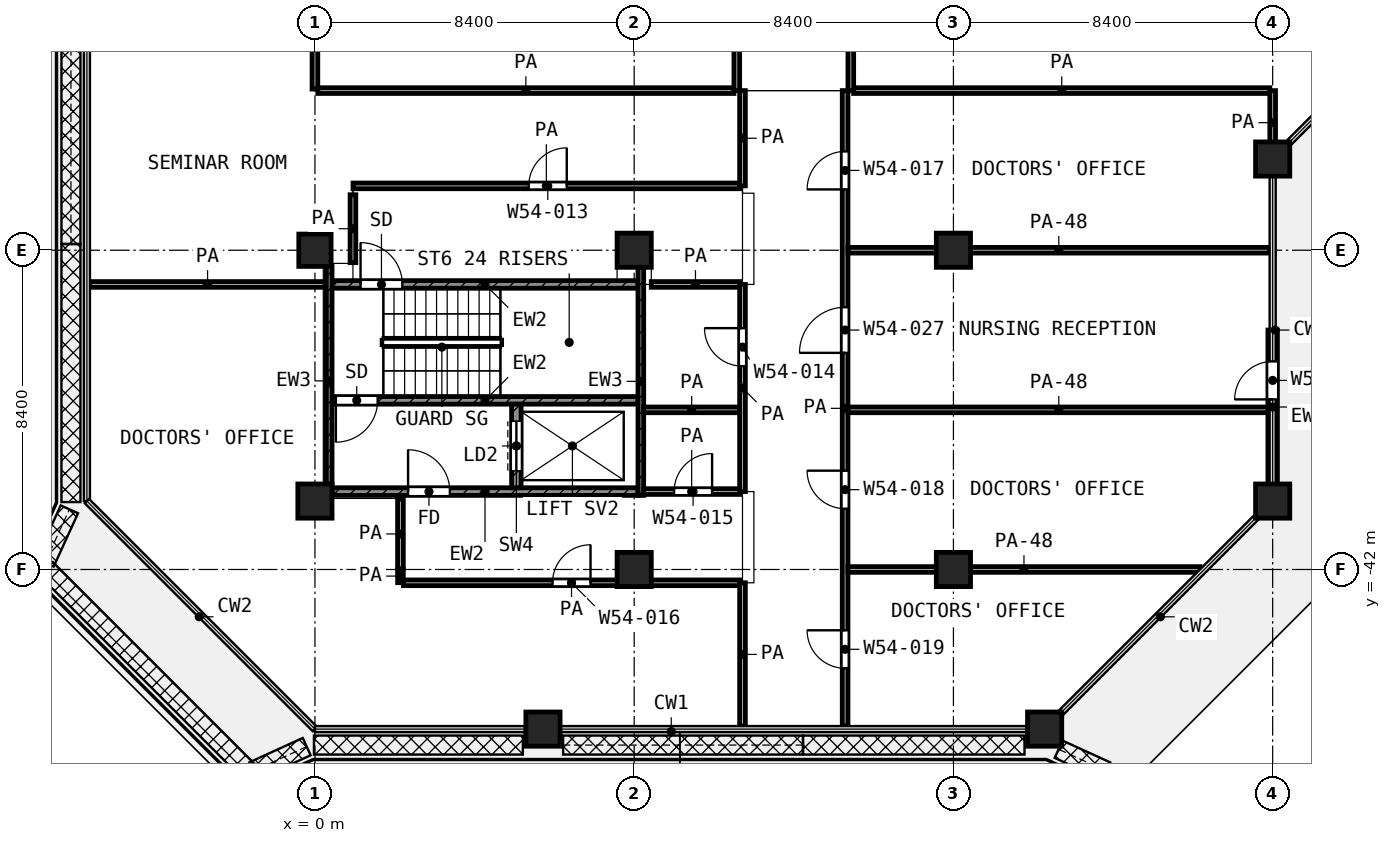
"""IFC4 building model, lengths in metres.
Left out: names, types, materials, properties, quantities, classifications, styles, units other than length and angle.
Written with IfcOpenShell. Run it as: python <this file> out.ifc"""

import sys

from ifc_helpers import new_model, si_unit, direction, frame, frame_2d, origin, origin_2d, place, context, subcontext, project, spatial, rectangle, extrude, element, fill, save


model = new_model("IFC4")
c1 = context("Model", 3, precision=1e-05, world=origin(), true_north=direction((0.0, 1.0)))
c2 = subcontext(c1, "Body", "Model", "MODEL_VIEW")
j1 = project(units=[si_unit("LENGTHUNIT", "METRE"), si_unit("PLANEANGLEUNIT", "RADIAN")], contexts=[c1])
p1 = place(None, origin())
s1 = spatial("IfcSite", under=j1, at=p1, CompositionType="ELEMENT")
p2 = place(p1, origin())
s2 = spatial("IfcBuilding", under=s1, at=p2, CompositionType="ELEMENT")
p3 = place(p2, frame((0.0, 0.0, 255.8)))
s3 = spatial("IfcBuildingStorey", under=s2, at=p3, CompositionType="ELEMENT", Elevation=255.8)
p4 = place(p3, frame((25.2, -31.2, 0.0), z_axis=(0.0, 0.0, 1.0), x_axis=(1.0, 0.0, 0.0)))
e1 = element("IfcColumn", 1, at=p4, inside=s3, PredefinedType="COLUMN", context=c2, shape_type="SweptSolid", body=[
    extrude(rectangle(XDim=0.9, YDim=0.9, at=origin_2d()), origin(), (0.0, 0.0, 1.0), 4.2),
])
p5 = place(p3, frame((0.0, -33.6, 0.0), z_axis=(0.0, 0.0, 1.0), x_axis=(1.0, 0.0, 0.0)))
e2 = element("IfcColumn", 2, at=p5, inside=s3, PredefinedType="COLUMN", context=c2, shape_type="SweptSolid", body=[
    extrude(rectangle(XDim=0.85, YDim=0.85, at=origin_2d()), origin(), (0.0, 0.0, 1.0), 4.2),
])
for number, where, z_axis, x_axis in (
    (3, (8.4, -33.6, 0.0), (0.0, 0.0, 1.0), (1.0, 0.0, 0.0)),
    (4, (16.8, -33.6, 0.0), (0.0, 0.0, 1.0), (1.0, 0.0, 0.0)),
    (5, (0.0, -40.2, 0.0), (0.0, 0.0, 1.0), (1.0, 0.0, 0.0)),
    (6, (25.2, -40.2, 0.0), (0.0, 0.0, 1.0), (1.0, 0.0, 0.0)),
    (7, (8.4, -42.0, 0.0), (0.0, 0.0, 1.0), (1.0, 0.0, 0.0)),
    (8, (16.8, -42.0, 0.0), (0.0, 0.0, 1.0), (1.0, 0.0, 0.0)),
    (9, (6.0, -46.2, 0.0), (0.0, 0.0, 1.0), (1.0, 0.0, 0.0)),
    (10, (19.2, -46.2, 0.0), (0.0, 0.0, 1.0), (1.0, 0.0, 0.0)),
):
    element("IfcColumn", number, at=place(p3, frame(where, z_axis=z_axis, x_axis=x_axis)), inside=s3, PredefinedType="COLUMN", context=c2, shape_type="SweptSolid", body=[
        extrude(rectangle(XDim=0.9, YDim=0.9, at=origin_2d()), origin(), (0.0, 0.0, 1.0), 4.2),
    ])
p6 = place(p3, frame((25.2, -39.75, 0.0), z_axis=(0.0, 0.0, 1.0), x_axis=(0.0, 1.0, 0.0)))
e11 = element("IfcWall", 11, at=p6, inside=s3, PredefinedType="SOLIDWALL", context=c2, shape_type="SweptSolid", body=[
    extrude(rectangle(XDim=4.05, YDim=0.25, at=frame_2d((2.025, 0.0))), origin(), (0.0, 0.0, 1.0), 2.58),
])
p7 = place(p6, frame((2.225, 0.0, 0.0)))
e12 = element("IfcOpeningElement", 12, at=p7, cuts=e11, PredefinedType="OPENING", context=c2, shape_type="SweptSolid", body=[
    extrude(rectangle(XDim=1.0, YDim=2.1, at=frame_2d((0.5, 1.05))), frame((0.0, 0.135, 0.0), z_axis=(0.0, -1.0, 0.0), x_axis=(1.0, 0.0, 0.0)), (0.0, 0.0, 1.0), 0.27),
])
p8 = place(p3, frame((0.375, -40.05, 0.0), z_axis=(0.0, 0.0, 1.0), x_axis=(0.0, 1.0, 0.0)))
e13 = element("IfcWall", 13, at=p8, inside=s3, PredefinedType="SHEAR", context=c2, shape_type="SweptSolid", body=[
    extrude(rectangle(XDim=6.025, YDim=0.15, at=frame_2d((3.013, 0.0))), origin(), (0.0, 0.0, 1.0), 3.6),
])
p9 = place(p3, frame((8.575, -40.05, 0.0), z_axis=(0.0, 0.0, 1.0), x_axis=(0.0, 1.0, 0.0)))
e14 = element("IfcWall", 14, at=p9, inside=s3, PredefinedType="SHEAR", context=c2, shape_type="SweptSolid", body=[
    extrude(rectangle(XDim=6.0, YDim=0.15, at=frame_2d((3.0, 0.0))), origin(), (0.0, 0.0, 1.0), 3.6),
])
p10 = place(p3, frame((0.45, -34.5, 0.0), z_axis=(0.0, 0.0, 1.0), x_axis=(1.0, 0.0, 0.0)))
e15 = element("IfcWall", 15, at=p10, inside=s3, PredefinedType="SHEAR", context=c2, shape_type="SweptSolid", body=[
    extrude(rectangle(XDim=8.05, YDim=0.2, at=frame_2d((4.025, 0.0))), origin(), (0.0, 0.0, 1.0), 3.6),
])
p11 = place(p10, frame((0.75, 0.0, 0.0)))
e16 = element("IfcOpeningElement", 16, at=p11, cuts=e15, PredefinedType="OPENING", context=c2, shape_type="SweptSolid", body=[
    extrude(rectangle(XDim=1.1, YDim=2.1, at=frame_2d((0.55, 1.05))), frame((0.0, 0.11, 0.0), z_axis=(0.0, -1.0, 0.0), x_axis=(1.0, 0.0, 0.0)), (0.0, 0.0, 1.0), 0.22),
])
p12 = place(p3, frame((0.45, -37.55, 0.0), z_axis=(0.0, 0.0, 1.0), x_axis=(1.0, 0.0, 0.0)))
e17 = element("IfcWall", 17, at=p12, inside=s3, PredefinedType="SHEAR", context=c2, shape_type="SweptSolid", body=[
    extrude(rectangle(XDim=8.05, YDim=0.2, at=frame_2d((4.025, 0.0))), origin(), (0.0, 0.0, 1.0), 3.6),
])
p13 = place(p12, frame((0.1, 0.0, 0.0)))
e18 = element("IfcOpeningElement", 18, at=p13, cuts=e17, PredefinedType="OPENING", context=c2, shape_type="SweptSolid", body=[
    extrude(rectangle(XDim=1.1, YDim=2.1, at=frame_2d((0.55, 1.05))), frame((0.0, 0.11, 0.0), z_axis=(0.0, -1.0, 0.0), x_axis=(1.0, 0.0, 0.0)), (0.0, 0.0, 1.0), 0.22),
])
p14 = place(p3, frame((0.45, -39.95, 0.0), z_axis=(0.0, 0.0, 1.0), x_axis=(1.0, 0.0, 0.0)))
e19 = element("IfcWall", 19, at=p14, inside=s3, PredefinedType="SHEAR", context=c2, shape_type="SweptSolid", body=[
    extrude(rectangle(XDim=8.05, YDim=0.2, at=frame_2d((4.025, 0.0))), origin(), (0.0, 0.0, 1.0), 3.6),
])
p15 = place(p14, frame((2.0, 0.0, 0.0)))
e20 = element("IfcOpeningElement", 20, at=p15, cuts=e19, PredefinedType="OPENING", context=c2, shape_type="SweptSolid", body=[
    extrude(rectangle(XDim=1.1, YDim=2.1, at=frame_2d((0.55, 1.05))), frame((0.0, 0.11, 0.0), z_axis=(0.0, -1.0, 0.0), x_axis=(1.0, 0.0, 0.0)), (0.0, 0.0, 1.0), 0.22),
])
p16 = place(p3, frame((5.3, -39.85, 0.0), z_axis=(0.0, 0.0, 1.0), x_axis=(0.0, 1.0, 0.0)))
e21 = element("IfcWall", 21, at=p16, inside=s3, PredefinedType="SHEAR", context=c2, shape_type="SweptSolid", body=[
    extrude(rectangle(XDim=2.2, YDim=0.25, at=frame_2d((1.1, 0.0))), origin(), (0.0, 0.0, 1.0), 3.6),
])
p17 = place(p16, frame((0.45, 0.0, 0.0)))
e22 = element("IfcOpeningElement", 22, at=p17, cuts=e21, PredefinedType="OPENING", context=c2, shape_type="SweptSolid", body=[
    extrude(rectangle(XDim=1.3, YDim=2.1, at=frame_2d((0.65, 1.05))), frame((0.0, 0.135, 0.0), z_axis=(0.0, -1.0, 0.0), x_axis=(1.0, 0.0, 0.0)), (0.0, 0.0, 1.0), 0.27),
])
p18 = place(p3, frame((2.327, -42.35, 0.0), z_axis=(0.0, 0.0, 1.0), x_axis=(1.0, 0.0, 0.0)))
e23 = element("IfcWall", 23, at=p18, inside=s3, PredefinedType="PARTITIONING", context=c2, shape_type="SweptSolid", body=[
    extrude(rectangle(XDim=8.848, YDim=0.15, at=frame_2d((4.424, 0.0))), origin(), (0.0, 0.0, 1.0), 3.6),
])
p19 = place(p18, frame((3.924, 0.0, 0.0)))
e24 = element("IfcOpeningElement", 24, at=p19, cuts=e23, PredefinedType="OPENING", context=c2, shape_type="SweptSolid", body=[
    extrude(rectangle(XDim=1.0, YDim=2.1, at=frame_2d((0.5, 1.05))), frame((0.0, 0.085, 0.0), z_axis=(0.0, -1.0, 0.0), x_axis=(1.0, 0.0, 0.0)), (0.0, 0.0, 1.0), 0.17),
])
p20 = place(p3, frame((14.025, -42.0, 0.0), z_axis=(0.0, 0.0, 1.0), x_axis=(1.0, 0.0, 0.0)))
e25 = element("IfcWall", 25, at=p20, inside=s3, PredefinedType="PARTITIONING", context=c2, shape_type="SweptSolid", body=[
    extrude(rectangle(XDim=9.262, YDim=0.15, at=frame_2d((4.631, 0.0))), origin(), (0.0, 0.0, 1.0), 2.7),
])
p21 = place(p3, frame((8.65, -39.95, 0.0), z_axis=(0.0, 0.0, 1.0), x_axis=(1.0, 0.0, 0.0)))
e26 = element("IfcWall", 26, at=p21, inside=s3, PredefinedType="PARTITIONING", context=c2, shape_type="SweptSolid", body=[
    extrude(rectangle(XDim=2.525, YDim=0.15, at=frame_2d((1.263, 0.0))), origin(), (0.0, 0.0, 1.0), 3.6),
])
p22 = place(p21, frame((0.8, 0.0, 0.0)))
e27 = element("IfcOpeningElement", 27, at=p22, cuts=e26, PredefinedType="OPENING", context=c2, shape_type="SweptSolid", body=[
    extrude(rectangle(XDim=1.0, YDim=2.1, at=frame_2d((0.5, 1.05))), frame((0.0, 0.085, 0.0), z_axis=(0.0, -1.0, 0.0), x_axis=(1.0, 0.0, 0.0)), (0.0, 0.0, 1.0), 0.17),
])
p23 = place(p3, frame((8.65, -37.8, 0.0), z_axis=(0.0, 0.0, 1.0), x_axis=(1.0, 0.0, 0.0)))
e28 = element("IfcWall", 28, at=p23, inside=s3, PredefinedType="PARTITIONING", context=c2, shape_type="SweptSolid", body=[
    extrude(rectangle(XDim=2.525, YDim=0.15, at=frame_2d((1.263, 0.0))), origin(), (0.0, 0.0, 1.0), 3.6),
])
p24 = place(p3, frame((14.025, -37.8, 0.0), z_axis=(0.0, 0.0, 1.0), x_axis=(1.0, 0.0, 0.0)))
e29 = element("IfcWall", 29, at=p24, inside=s3, PredefinedType="PARTITIONING", context=c2, shape_type="SweptSolid", body=[
    extrude(rectangle(XDim=11.095, YDim=0.15, at=frame_2d((5.548, 0.0))), origin(), (0.0, 0.0, 1.0), 2.7),
])
p25 = place(p3, frame((-5.92, -34.5, 0.0), z_axis=(0.0, 0.0, 1.0), x_axis=(1.0, 0.0, 0.0)))
e30 = element("IfcWall", 30, at=p25, inside=s3, PredefinedType="PARTITIONING", context=c2, shape_type="SweptSolid", body=[
    extrude(rectangle(XDim=6.19, YDim=0.15, at=frame_2d((3.095, 0.0))), origin(), (0.0, 0.0, 1.0), 3.6),
])
p26 = place(p3, frame((8.85, -34.5, 0.0), z_axis=(0.0, 0.0, 1.0), x_axis=(1.0, 0.0, 0.0)))
e31 = element("IfcWall", 31, at=p26, inside=s3, PredefinedType="PARTITIONING", context=c2, shape_type="SweptSolid", body=[
    extrude(rectangle(XDim=2.325, YDim=0.15, at=frame_2d((1.163, 0.0))), origin(), (0.0, 0.0, 1.0), 3.6),
])
p27 = place(p3, frame((14.025, -33.6, 0.0), z_axis=(0.0, 0.0, 1.0), x_axis=(1.0, 0.0, 0.0)))
e32 = element("IfcWall", 32, at=p27, inside=s3, PredefinedType="PARTITIONING", context=c2, shape_type="SweptSolid", body=[
    extrude(rectangle(XDim=11.095, YDim=0.15, at=frame_2d((5.548, 0.0))), origin(), (0.0, 0.0, 1.0), 2.7),
])
p28 = place(p3, frame((1.002, -31.907, 0.0), z_axis=(0.0, 0.0, 1.0), x_axis=(1.0, 0.0, 0.0)))
e33 = element("IfcWall", 33, at=p28, inside=s3, PredefinedType="PARTITIONING", context=c2, shape_type="SweptSolid", body=[
    extrude(rectangle(XDim=10.173, YDim=0.15, at=frame_2d((5.086, 0.0))), origin(), (0.0, 0.0, 1.0), 3.6),
])
p29 = place(p28, frame((4.624, 0.0, 0.0)))
e34 = element("IfcOpeningElement", 34, at=p29, cuts=e33, PredefinedType="OPENING", context=c2, shape_type="SweptSolid", body=[
    extrude(rectangle(XDim=1.0, YDim=2.1, at=frame_2d((0.5, 1.05))), frame((0.0, 0.085, 0.0), z_axis=(0.0, -1.0, 0.0), x_axis=(1.0, 0.0, 0.0)), (0.0, 0.0, 1.0), 0.17),
])
for number, where, z_axis, x_axis in (
    (35, (0.075, -29.4, 0.0), (0.0, 0.0, 1.0), (1.0, 0.0, 0.0)),
    (36, (14.175, -29.4, 0.0), (0.0, 0.0, 1.0), (1.0, 0.0, 0.0)),
):
    element("IfcWall", number, at=place(p3, frame(where, z_axis=z_axis, x_axis=x_axis)), inside=s3, PredefinedType="PARTITIONING", context=c2, shape_type="SweptSolid", body=[
        extrude(rectangle(XDim=10.95, YDim=0.15, at=frame_2d((5.475, 0.0))), origin(), (0.0, 0.0, 1.0), 3.6),
    ])
p30 = place(p3, frame((0.0, -29.36, 0.0), z_axis=(0.0, 0.0, 1.0), x_axis=(0.0, 1.0, 0.0)))
e37 = element("IfcWall", 37, at=p30, inside=s3, PredefinedType="PARTITIONING", context=c2, shape_type="SweptSolid", body=[
    extrude(rectangle(XDim=4.56, YDim=0.15, at=frame_2d((2.28, 0.0))), origin(), (0.0, 0.0, 1.0), 3.6),
])
p31 = place(p3, frame((1.0, -33.927, 0.0), z_axis=(0.0, 0.0, 1.0), x_axis=(0.0, 1.0, 0.0)))
e38 = element("IfcWall", 38, at=p31, inside=s3, PredefinedType="PARTITIONING", context=c2, shape_type="SweptSolid", body=[
    extrude(rectangle(XDim=1.787, YDim=0.15, at=frame_2d((0.894, 0.0))), origin(), (0.0, 0.0, 1.0), 3.6),
])
p32 = place(p3, frame((2.25, -42.348, 0.0), z_axis=(0.0, 0.0, 1.0), x_axis=(0.0, 1.0, 0.0)))
e39 = element("IfcWall", 39, at=p32, inside=s3, PredefinedType="PARTITIONING", context=c2, shape_type="SweptSolid", body=[
    extrude(rectangle(XDim=0.348, YDim=0.15, at=frame_2d((0.174, 0.0))), origin(), (0.0, 0.0, 1.0), 3.6),
])
p33 = place(p3, frame((2.25, -41.98, 0.0), z_axis=(0.0, 0.0, 1.0), x_axis=(0.0, 1.0, 0.0)))
e40 = element("IfcWall", 40, at=p33, inside=s3, PredefinedType="PARTITIONING", context=c2, shape_type="SweptSolid", body=[
    extrude(rectangle(XDim=1.83, YDim=0.15, at=frame_2d((0.915, 0.0))), origin(), (0.0, 0.0, 1.0), 3.6),
])
p34 = place(p3, frame((11.1, -29.4, 0.0), z_axis=(0.0, 0.0, 1.0), x_axis=(0.0, 1.0, 0.0)))
e41 = element("IfcWall", 41, at=p34, inside=s3, PredefinedType="PARTITIONING", context=c2, shape_type="SweptSolid", body=[
    extrude(rectangle(XDim=4.6, YDim=0.15, at=frame_2d((2.3, 0.0))), origin(), (0.0, 0.0, 1.0), 3.6),
])
p35 = place(p34, frame((1.6, 0.0, 0.0)))
e42 = element("IfcOpeningElement", 42, at=p35, cuts=e41, PredefinedType="OPENING", context=c2, shape_type="SweptSolid", body=[
    extrude(rectangle(XDim=1.0, YDim=2.1, at=frame_2d((0.5, 1.05))), frame((0.0, 0.085, 0.0), z_axis=(0.0, -1.0, 0.0), x_axis=(1.0, 0.0, 0.0)), (0.0, 0.0, 1.0), 0.17),
])
p36 = place(p3, frame((11.25, -46.12, 0.0), z_axis=(0.0, 0.0, 1.0), x_axis=(0.0, 1.0, 0.0)))
e43 = element("IfcWall", 43, at=p36, inside=s3, PredefinedType="PARTITIONING", context=c2, shape_type="SweptSolid", body=[
    extrude(rectangle(XDim=3.77, YDim=0.15, at=frame_2d((1.885, 0.0))), origin(), (0.0, 0.0, 1.0), 3.6),
])
p37 = place(p3, frame((11.25, -39.95, 0.0), z_axis=(0.0, 0.0, 1.0), x_axis=(0.0, 1.0, 0.0)))
e44 = element("IfcWall", 44, at=p37, inside=s3, PredefinedType="PARTITIONING", context=c2, shape_type="SweptSolid", body=[
    extrude(rectangle(XDim=5.45, YDim=0.15, at=frame_2d((2.725, 0.0))), origin(), (0.0, 0.0, 1.0), 3.6),
])
p38 = place(p37, frame((3.3, 0.0, 0.0)))
e45 = element("IfcOpeningElement", 45, at=p38, cuts=e44, PredefinedType="OPENING", context=c2, shape_type="SweptSolid", body=[
    extrude(rectangle(XDim=1.0, YDim=2.1, at=frame_2d((0.5, 1.05))), frame((0.0, 0.085, 0.0), z_axis=(0.0, -1.0, 0.0), x_axis=(1.0, 0.0, 0.0)), (0.0, 0.0, 1.0), 0.17),
])
p39 = place(p3, frame((11.25, -31.907, 0.0), z_axis=(0.0, 0.0, 1.0), x_axis=(0.0, 1.0, 0.0)))
e46 = element("IfcWall", 46, at=p39, inside=s3, PredefinedType="PARTITIONING", context=c2, shape_type="SweptSolid", body=[
    extrude(rectangle(XDim=2.507, YDim=0.15, at=frame_2d((1.253, 0.0))), origin(), (0.0, 0.0, 1.0), 3.6),
])
p40 = place(p3, frame((13.95, -46.12, 0.0), z_axis=(0.0, 0.0, 1.0), x_axis=(0.0, 1.0, 0.0)))
e47 = element("IfcWall", 47, at=p40, inside=s3, PredefinedType="PARTITIONING", context=c2, shape_type="SweptSolid", body=[
    extrude(rectangle(XDim=16.72, YDim=0.15, at=frame_2d((8.36, 0.0))), origin(), (0.0, 0.0, 1.0), 3.6),
])
p41 = place(p40, frame((14.12, 0.0, 0.0)))
e48 = element("IfcOpeningElement", 48, at=p41, cuts=e47, PredefinedType="OPENING", context=c2, shape_type="SweptSolid", body=[
    extrude(rectangle(XDim=1.0, YDim=2.1, at=frame_2d((0.5, 1.05))), frame((0.0, 0.085, 0.0), z_axis=(0.0, -1.0, 0.0), x_axis=(1.0, 0.0, 0.0)), (0.0, 0.0, 1.0), 0.17),
])
p42 = place(p40, frame((9.82, 0.0, 0.0)))
e49 = element("IfcOpeningElement", 49, at=p42, cuts=e47, PredefinedType="OPENING", context=c2, shape_type="SweptSolid", body=[
    extrude(rectangle(XDim=1.2, YDim=2.1, at=frame_2d((0.6, 1.05))), frame((0.0, 0.085, 0.0), z_axis=(0.0, -1.0, 0.0), x_axis=(1.0, 0.0, 0.0)), (0.0, 0.0, 1.0), 0.17),
])
p43 = place(p40, frame((5.72, 0.0, 0.0)))
e50 = element("IfcOpeningElement", 50, at=p43, cuts=e47, PredefinedType="OPENING", context=c2, shape_type="SweptSolid", body=[
    extrude(rectangle(XDim=1.0, YDim=2.1, at=frame_2d((0.5, 1.05))), frame((0.0, 0.085, 0.0), z_axis=(0.0, -1.0, 0.0), x_axis=(1.0, 0.0, 0.0)), (0.0, 0.0, 1.0), 0.17),
])
p44 = place(p40, frame((1.52, 0.0, 0.0)))
e51 = element("IfcOpeningElement", 51, at=p44, cuts=e47, PredefinedType="OPENING", context=c2, shape_type="SweptSolid", body=[
    extrude(rectangle(XDim=1.0, YDim=2.1, at=frame_2d((0.5, 1.05))), frame((0.0, 0.085, 0.0), z_axis=(0.0, -1.0, 0.0), x_axis=(1.0, 0.0, 0.0)), (0.0, 0.0, 1.0), 0.17),
])
p45 = place(p3, frame((14.1, -29.4, 0.0), z_axis=(0.0, 0.0, 1.0), x_axis=(0.0, 1.0, 0.0)))
e52 = element("IfcWall", 52, at=p45, inside=s3, PredefinedType="PARTITIONING", context=c2, shape_type="SweptSolid", body=[
    extrude(rectangle(XDim=4.6, YDim=0.15, at=frame_2d((2.3, 0.0))), origin(), (0.0, 0.0, 1.0), 3.6),
])
p46 = place(p3, frame((25.2, -31.087, 0.0), z_axis=(0.0, 0.0, 1.0), x_axis=(0.0, 1.0, 0.0)))
e53 = element("IfcWall", 53, at=p46, inside=s3, PredefinedType="PARTITIONING", context=c2, shape_type="SweptSolid", body=[
    extrude(rectangle(XDim=1.687, YDim=0.15, at=frame_2d((0.844, 0.0))), origin(), (0.0, 0.0, 1.0), 3.6),
])
p47 = place(p7, origin())
e54 = element("IfcDoor", 54, at=p47, inside=s3, OperationType="SINGLE_SWING_LEFT", PredefinedType="DOOR", context=c2, shape_type="SweptSolid", body=[
    extrude(rectangle(XDim=1.0, YDim=2.1, at=frame_2d((0.5, 1.05))), frame((0.0, 0.025, 0.0), z_axis=(0.0, -1.0, 0.0), x_axis=(1.0, 0.0, 0.0)), (0.0, 0.0, 1.0), 0.05),
])
fill(e12, e54)
p48 = place(p11, origin())
e55 = element("IfcDoor", 55, at=p48, inside=s3, OperationType="SINGLE_SWING_LEFT", PredefinedType="DOOR", context=c2, shape_type="SweptSolid", body=[
    extrude(rectangle(XDim=1.1, YDim=2.1, at=frame_2d((0.55, 1.05))), frame((0.0, 0.025, 0.0), z_axis=(0.0, -1.0, 0.0), x_axis=(1.0, 0.0, 0.0)), (0.0, 0.0, 1.0), 0.05),
])
fill(e16, e55)
p49 = place(p13, frame((1.1, 0.0, 0.0), z_axis=(0.0, 0.0, 1.0), x_axis=(-1.0, 0.0, 0.0)))
e56 = element("IfcDoor", 56, at=p49, inside=s3, OperationType="SINGLE_SWING_LEFT", PredefinedType="DOOR", context=c2, shape_type="SweptSolid", body=[
    extrude(rectangle(XDim=1.1, YDim=2.1, at=frame_2d((0.55, 1.05))), frame((0.0, 0.025, 0.0), z_axis=(0.0, -1.0, 0.0), x_axis=(1.0, 0.0, 0.0)), (0.0, 0.0, 1.0), 0.05),
])
fill(e18, e56)
p50 = place(p17, origin())
e57 = element("IfcDoor", 57, at=p50, inside=s3, OperationType="DOUBLE_DOOR_SLIDING", PredefinedType="DOOR", context=c2, shape_type="SweptSolid", body=[
    extrude(rectangle(XDim=1.3, YDim=2.1, at=frame_2d((0.65, 1.05))), frame((0.0, 0.025, 0.0), z_axis=(0.0, -1.0, 0.0), x_axis=(1.0, 0.0, 0.0)), (0.0, 0.0, 1.0), 0.05),
])
fill(e22, e57)
p51 = place(p15, origin())
e58 = element("IfcDoor", 58, at=p51, inside=s3, OperationType="SINGLE_SWING_LEFT", PredefinedType="DOOR", context=c2, shape_type="SweptSolid", body=[
    extrude(rectangle(XDim=1.1, YDim=2.1, at=frame_2d((0.55, 1.05))), frame((0.0, 0.025, 0.0), z_axis=(0.0, -1.0, 0.0), x_axis=(1.0, 0.0, 0.0)), (0.0, 0.0, 1.0), 0.05),
])
fill(e20, e58)
p52 = place(p29, origin())
e59 = element("IfcDoor", 59, at=p52, inside=s3, OperationType="SINGLE_SWING_RIGHT", PredefinedType="DOOR", context=c2, shape_type="SweptSolid", body=[
    extrude(rectangle(XDim=1.0, YDim=2.1, at=frame_2d((0.5, 1.05))), frame((0.0, 0.025, 0.0), z_axis=(0.0, -1.0, 0.0), x_axis=(1.0, 0.0, 0.0)), (0.0, 0.0, 1.0), 0.05),
])
fill(e34, e59)
p53 = place(p38, origin())
e60 = element("IfcDoor", 60, at=p53, inside=s3, OperationType="SINGLE_SWING_RIGHT", PredefinedType="DOOR", context=c2, shape_type="SweptSolid", body=[
    extrude(rectangle(XDim=1.0, YDim=2.1, at=frame_2d((0.5, 1.05))), frame((0.0, 0.025, 0.0), z_axis=(0.0, -1.0, 0.0), x_axis=(1.0, 0.0, 0.0)), (0.0, 0.0, 1.0), 0.05),
])
fill(e45, e60)
p54 = place(p22, origin())
e61 = element("IfcDoor", 61, at=p54, inside=s3, OperationType="SINGLE_SWING_RIGHT", PredefinedType="DOOR", context=c2, shape_type="SweptSolid", body=[
    extrude(rectangle(XDim=1.0, YDim=2.1, at=frame_2d((0.5, 1.05))), frame((0.0, 0.025, 0.0), z_axis=(0.0, -1.0, 0.0), x_axis=(1.0, 0.0, 0.0)), (0.0, 0.0, 1.0), 0.05),
])
fill(e27, e61)
p55 = place(p19, origin())
e62 = element("IfcDoor", 62, at=p55, inside=s3, OperationType="SINGLE_SWING_RIGHT", PredefinedType="DOOR", context=c2, shape_type="SweptSolid", body=[
    extrude(rectangle(XDim=1.0, YDim=2.1, at=frame_2d((0.5, 1.05))), frame((0.0, 0.025, 0.0), z_axis=(0.0, -1.0, 0.0), x_axis=(1.0, 0.0, 0.0)), (0.0, 0.0, 1.0), 0.05),
])
fill(e24, e62)
p56 = place(p41, origin())
e63 = element("IfcDoor", 63, at=p56, inside=s3, OperationType="SINGLE_SWING_LEFT", PredefinedType="DOOR", context=c2, shape_type="SweptSolid", body=[
    extrude(rectangle(XDim=1.0, YDim=2.1, at=frame_2d((0.5, 1.05))), frame((0.0, 0.025, 0.0), z_axis=(0.0, -1.0, 0.0), x_axis=(1.0, 0.0, 0.0)), (0.0, 0.0, 1.0), 0.05),
])
fill(e48, e63)
p57 = place(p42, origin())
e64 = element("IfcDoor", 64, at=p57, inside=s3, OperationType="SINGLE_SWING_LEFT", PredefinedType="DOOR", context=c2, shape_type="SweptSolid", body=[
    extrude(rectangle(XDim=1.2, YDim=2.1, at=frame_2d((0.6, 1.05))), frame((0.0, 0.025, 0.0), z_axis=(0.0, -1.0, 0.0), x_axis=(1.0, 0.0, 0.0)), (0.0, 0.0, 1.0), 0.05),
])
fill(e49, e64)
p58 = place(p43, origin())
e65 = element("IfcDoor", 65, at=p58, inside=s3, OperationType="SINGLE_SWING_RIGHT", PredefinedType="DOOR", context=c2, shape_type="SweptSolid", body=[
    extrude(rectangle(XDim=1.0, YDim=2.1, at=frame_2d((0.5, 1.05))), frame((0.0, 0.025, 0.0), z_axis=(0.0, -1.0, 0.0), x_axis=(1.0, 0.0, 0.0)), (0.0, 0.0, 1.0), 0.05),
])
fill(e50, e65)
p59 = place(p44, origin())
e66 = element("IfcDoor", 66, at=p59, inside=s3, OperationType="SINGLE_SWING_RIGHT", PredefinedType="DOOR", context=c2, shape_type="SweptSolid", body=[
    extrude(rectangle(XDim=1.0, YDim=2.1, at=frame_2d((0.5, 1.05))), frame((0.0, 0.025, 0.0), z_axis=(0.0, -1.0, 0.0), x_axis=(1.0, 0.0, 0.0)), (0.0, 0.0, 1.0), 0.05),
])
fill(e51, e66)
save(model, sys.argv[1])
